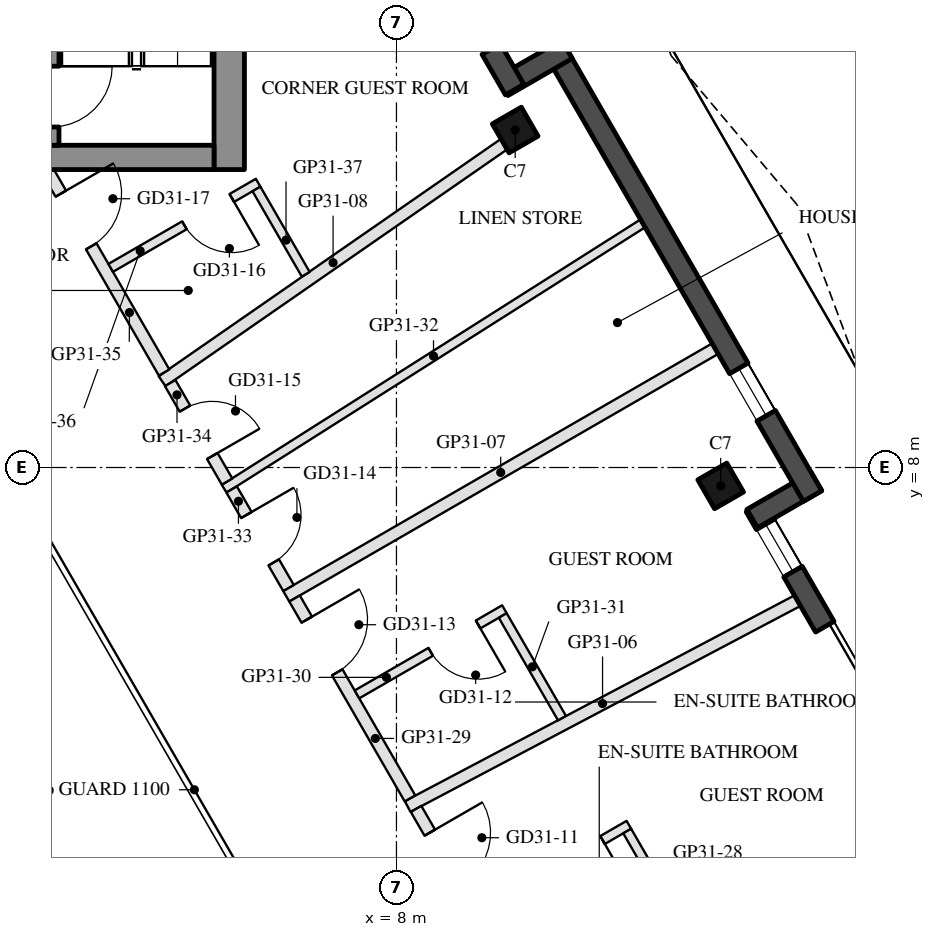
"""IFC4 building model, lengths in metres.
Left out: names, types, materials, properties, quantities, classifications, styles, units other than length and angle.
Written with IfcOpenShell. Run it as: python <this file> out.ifc"""

import sys

from ifc_helpers import new_model, si_unit, direction, frame, frame_2d, origin, origin_2d, place, context, subcontext, project, spatial, rectangle, hollow_rectangle, extrude, boolean, halfspace, element, fill, save


model = new_model("IFC4")
c1 = context("Model", 3, precision=1e-05, world=origin(), true_north=direction((0.0, 1.0)))
c2 = subcontext(c1, "Body", "Model", "MODEL_VIEW")
j1 = project(units=[si_unit("LENGTHUNIT", "METRE"), si_unit("PLANEANGLEUNIT", "RADIAN")], contexts=[c1])
p1 = place(None, origin())
s1 = spatial("IfcSite", under=j1, at=p1, CompositionType="ELEMENT")
p2 = place(p1, origin())
s2 = spatial("IfcBuilding", under=s1, at=p2, CompositionType="ELEMENT")
p3 = place(p2, frame((0.0, 0.0, 302.2)))
s3 = spatial("IfcBuildingStorey", under=s2, at=p3, CompositionType="ELEMENT", Elevation=302.2)
p4 = place(p3, frame((13.332, 7.697, 0.0), z_axis=(0.0, 0.0, 1.0), x_axis=(-0.5, 0.866025403784, 0.0)))
e1 = element("IfcColumn", 1, at=p4, inside=s3, PredefinedType="COLUMN", context=c2, shape_type="SweptSolid", body=[
    boolean("DIFFERENCE", extrude(hollow_rectangle(XDim=0.55, YDim=0.55, WallThickness=0.025, at=origin_2d()), origin(), (0.0, 0.0, 1.0), 3.7), halfspace(frame((0.0, 0.0, 0.031), z_axis=(0.0, 0.0, 1.0), x_axis=(1.0, 0.0, 0.0)), True)),
])
p5 = place(p3, frame((9.953, 13.551, 0.0), z_axis=(0.0, 0.0, 1.0), x_axis=(-0.5, 0.866025403784, 0.0)))
e2 = element("IfcColumn", 2, at=p5, inside=s3, PredefinedType="COLUMN", context=c2, shape_type="SweptSolid", body=[
    boolean("DIFFERENCE", extrude(hollow_rectangle(XDim=0.55, YDim=0.55, WallThickness=0.025, at=origin_2d()), origin(), (0.0, 0.0, 1.0), 3.7), halfspace(frame((0.0, 0.0, 0.034), z_axis=(0.0, 0.0, 1.0), x_axis=(1.0, 0.0, 0.0)), True)),
])
p6 = place(p3, frame((16.703, 2.509, 0.0), z_axis=(0.0, 0.0, 1.0), x_axis=(-0.499975351079, 0.866039634378, 0.0)))
e3 = element("IfcWall", 3, at=p6, inside=s3, PredefinedType="SOLIDWALL", context=c2, shape_type="SweptSolid", body=[
    extrude(rectangle(XDim=5.599, YDim=0.35, at=frame_2d((2.799, 0.0))), origin(), (0.0, 0.0, 1.0), 3.55),
])
p7 = place(p6, frame((0.917, 0.0, 0.0)))
e4 = element("IfcOpeningElement", 4, at=p7, cuts=e3, PredefinedType="OPENING", context=c2, shape_type="SweptSolid", body=[
    extrude(rectangle(XDim=2.4, YDim=2.4, at=frame_2d((1.2, 1.2))), frame((0.0, 0.185, 0.0), z_axis=(0.0, -1.0, 0.0), x_axis=(1.0, 0.0, 0.0)), (0.0, 0.0, 1.0), 0.37),
])
p8 = place(p6, frame((4.363, 0.0, 0.3)))
e5 = element("IfcOpeningElement", 5, at=p8, cuts=e3, PredefinedType="OPENING", context=c2, shape_type="SweptSolid", body=[
    extrude(rectangle(XDim=0.9, YDim=2.65, at=frame_2d((0.45, 1.325))), frame((0.0, 0.185, 0.0), z_axis=(0.0, -1.0, 0.0), x_axis=(1.0, 0.0, 0.0)), (0.0, 0.0, 1.0), 0.37),
])
p9 = place(p3, frame((13.85, 7.159, 0.0), z_axis=(0.0, 0.0, 1.0), x_axis=(0.866005645448, 0.500034220881, 0.0)))
e6 = element("IfcWall", 6, at=p9, inside=s3, PredefinedType="SOLIDWALL", context=c2, shape_type="SweptSolid", body=[
    extrude(rectangle(XDim=1.22, YDim=0.35, at=frame_2d((0.61, 0.0))), origin(), (0.0, 0.0, 1.0), 3.55),
])
p10 = place(p3, frame((14.843, 7.531, 0.0), z_axis=(0.0, 0.0, 1.0), x_axis=(-0.500013816581, 0.866017426631, 0.0)))
e7 = element("IfcWall", 7, at=p10, inside=s3, PredefinedType="SOLIDWALL", context=c2, shape_type="SweptSolid", body=[
    extrude(rectangle(XDim=8.559, YDim=0.35, at=frame_2d((4.279, 0.0))), origin(), (0.0, 0.0, 1.0), 3.55),
])
p11 = place(p10, frame((1.525, 0.0, 0.3)))
e8 = element("IfcOpeningElement", 8, at=p11, cuts=e7, PredefinedType="OPENING", context=c2, shape_type="SweptSolid", body=[
    extrude(rectangle(XDim=0.9, YDim=2.65, at=frame_2d((0.45, 1.325))), frame((0.0, 0.185, 0.0), z_axis=(0.0, -1.0, 0.0), x_axis=(1.0, 0.0, 0.0)), (0.0, 0.0, 1.0), 0.37),
])
p12 = place(p3, frame((10.802, 14.879, 0.0), z_axis=(0.0, 0.0, 1.0), x_axis=(-0.866005645448, -0.500034220881, 0.0)))
e9 = element("IfcWall", 9, at=p12, inside=s3, PredefinedType="SOLIDWALL", context=c2, shape_type="SweptSolid", body=[
    extrude(rectangle(XDim=1.22, YDim=0.35, at=frame_2d((0.61, 0.0))), origin(), (0.0, 0.0, 1.0), 3.55),
])
p13 = place(p3, frame((9.944, 14.216, 0.0), z_axis=(0.0, 0.0, 1.0), x_axis=(-0.500026936782, 0.866009851268, 0.0)))
e10 = element("IfcWall", 10, at=p13, inside=s3, PredefinedType="SOLIDWALL", context=c2, shape_type="SweptSolid", body=[
    extrude(rectangle(XDim=5.599, YDim=0.35, at=frame_2d((2.799, 0.0))), origin(), (0.0, 0.0, 1.0), 3.55),
])
p14 = place(p13, frame((0.77, 0.0, 0.0)))
e11 = element("IfcOpeningElement", 11, at=p14, cuts=e10, PredefinedType="OPENING", context=c2, shape_type="SweptSolid", body=[
    extrude(rectangle(XDim=2.4, YDim=2.4, at=frame_2d((1.2, 1.2))), frame((0.0, 0.185, 0.0), z_axis=(0.0, -1.0, 0.0), x_axis=(1.0, 0.0, 0.0)), (0.0, 0.0, 1.0), 0.37),
])
p15 = place(p13, frame((3.47, 0.0, 0.3)))
e12 = element("IfcOpeningElement", 12, at=p15, cuts=e10, PredefinedType="OPENING", context=c2, shape_type="SweptSolid", body=[
    extrude(rectangle(XDim=1.8, YDim=2.65, at=frame_2d((0.9, 1.325))), frame((0.0, 0.185, 0.0), z_axis=(0.0, -1.0, 0.0), x_axis=(1.0, 0.0, 0.0)), (0.0, 0.0, 1.0), 0.37),
])
p16 = place(p3, frame((5.25, 12.9, 0.0), z_axis=(0.0, 0.0, 1.0), x_axis=(0.0, 1.0, 0.0)))
e13 = element("IfcWall", 13, at=p16, inside=s3, PredefinedType="SHEAR", context=c2, shape_type="SweptSolid", body=[
    extrude(rectangle(XDim=10.299, YDim=0.5, at=frame_2d((5.149, 0.0))), origin(), (0.0, 0.0, 1.0), 3.5),
])
p17 = place(p3, frame((5.0, 13.1, 0.0), z_axis=(0.0, 0.0, 1.0), x_axis=(-1.0, 0.0, 0.0)))
e14 = element("IfcWall", 14, at=p17, inside=s3, PredefinedType="SHEAR", context=c2, shape_type="SweptSolid", body=[
    extrude(rectangle(XDim=10.0, YDim=0.4, at=frame_2d((5.0, 0.0))), origin(), (0.0, 0.0, 1.0), 3.5),
])
p18 = place(p17, frame((3.55, 0.0, 0.0)))
e15 = element("IfcOpeningElement", 15, at=p18, cuts=e14, PredefinedType="OPENING", context=c2, shape_type="SweptSolid", body=[
    extrude(rectangle(XDim=1.1, YDim=2.1, at=frame_2d((0.55, 1.05))), frame((0.0, 0.21, 0.0), z_axis=(0.0, -1.0, 0.0), x_axis=(1.0, 0.0, 0.0)), (0.0, 0.0, 1.0), 0.42),
])
p19 = place(p17, frame((5.85, 0.0, 0.0)))
e16 = element("IfcOpeningElement", 16, at=p19, cuts=e14, PredefinedType="OPENING", context=c2, shape_type="SweptSolid", body=[
    extrude(rectangle(XDim=1.4, YDim=2.1, at=frame_2d((0.7, 1.05))), frame((0.0, 0.21, 0.0), z_axis=(0.0, -1.0, 0.0), x_axis=(1.0, 0.0, 0.0)), (0.0, 0.0, 1.0), 0.42),
])
p20 = place(p3, frame((2.325, 13.3, 0.0), z_axis=(0.0, 0.0, 1.0), x_axis=(0.0, 1.0, 0.0)))
e17 = element("IfcWall", 17, at=p20, inside=s3, PredefinedType="SHEAR", context=c2, shape_type="SweptSolid", body=[
    extrude(rectangle(XDim=6.45, YDim=0.25, at=frame_2d((3.225, 0.0))), origin(), (0.0, 0.0, 1.0), 3.5),
])
p21 = place(p20, frame((0.3, 0.0, 0.0)))
e18 = element("IfcOpeningElement", 18, at=p21, cuts=e17, PredefinedType="OPENING", context=c2, shape_type="SweptSolid", body=[
    extrude(rectangle(XDim=1.0, YDim=2.1, at=frame_2d((0.5, 1.05))), frame((0.0, 0.135, 0.0), z_axis=(0.0, -1.0, 0.0), x_axis=(1.0, 0.0, 0.0)), (0.0, 0.0, 1.0), 0.27),
])
p22 = place(p3, frame((14.595, 5.81, 0.0), z_axis=(0.0, 0.0, 1.0), x_axis=(-0.884286267242, -0.46694517619, 0.0)))
e19 = element("IfcWall", 19, at=p22, inside=s3, PredefinedType="PARTITIONING", context=c2, shape_type="SweptSolid", body=[
    extrude(rectangle(XDim=7.25, YDim=0.2, at=frame_2d((3.625, 0.0))), origin(), (0.0, 0.0, 1.0), 3.16),
])
p23 = place(p3, frame((13.241, 9.954, 0.0), z_axis=(0.0, 0.0, 1.0), x_axis=(-0.866028345359, -0.499994905008, 0.0)))
e20 = element("IfcWall", 20, at=p23, inside=s3, PredefinedType="PARTITIONING", context=c2, shape_type="SweptSolid", body=[
    extrude(rectangle(XDim=8.145, YDim=0.2, at=frame_2d((4.072, 0.0))), origin(), (0.0, 0.0, 1.0), 3.16),
])
p24 = place(p3, frame((9.769, 13.318, 0.0), z_axis=(0.0, 0.0, 1.0), x_axis=(-0.821728251777, -0.569879531332, 0.0)))
e21 = element("IfcWall", 21, at=p24, inside=s3, PredefinedType="PARTITIONING", context=c2, shape_type="SweptSolid", body=[
    extrude(rectangle(XDim=6.843, YDim=0.2, at=frame_2d((3.421, 0.0))), origin(), (0.0, 0.0, 1.0), 3.1),
])
p25 = place(p3, frame((8.323, 2.385, 0.0), z_axis=(0.0, 0.0, 1.0), x_axis=(0.499998569178, -0.866026229868, 0.0)))
e22 = element("IfcWall", 22, at=p25, inside=s3, PredefinedType="PARTITIONING", context=c2, shape_type="SweptSolid", body=[
    extrude(rectangle(XDim=3.878, YDim=0.2, at=frame_2d((1.939, 0.0))), origin(), (0.0, 0.0, 1.0), 3.1),
])
p26 = place(p25, frame((0.451, 0.0, 0.0)))
e23 = element("IfcOpeningElement", 23, at=p26, cuts=e22, PredefinedType="OPENING", context=c2, shape_type="SweptSolid", body=[
    extrude(rectangle(XDim=1.0, YDim=2.1, at=frame_2d((0.5, 1.05))), frame((0.0, 0.11, 0.0), z_axis=(0.0, -1.0, 0.0), x_axis=(1.0, 0.0, 0.0)), (0.0, 0.0, 1.0), 0.22),
])
p27 = place(p3, frame((11.822, 2.123, 0.0), z_axis=(0.0, 0.0, 1.0), x_axis=(-0.865996816683, -0.500049511043, 0.0)))
e24 = element("IfcWall", 24, at=p27, inside=s3, PredefinedType="PARTITIONING", context=c2, shape_type="SweptSolid", body=[
    extrude(rectangle(XDim=2.8, YDim=0.15, at=frame_2d((1.4, 0.0))), origin(), (0.0, 0.0, 1.0), 3.55),
])
p28 = place(p27, frame((0.5, 0.0, 0.0)))
e25 = element("IfcOpeningElement", 25, at=p28, cuts=e24, PredefinedType="OPENING", context=c2, shape_type="SweptSolid", body=[
    extrude(rectangle(XDim=0.9, YDim=2.1, at=frame_2d((0.45, 1.05))), frame((0.0, 0.085, 0.0), z_axis=(0.0, -1.0, 0.0), x_axis=(1.0, 0.0, 0.0)), (0.0, 0.0, 1.0), 0.17),
])
p29 = place(p3, frame((13.034, -0.125, 0.0), z_axis=(0.0, 0.0, 1.0), x_axis=(-0.499975499923, 0.866039548448, 0.0)))
e26 = element("IfcWall", 26, at=p29, inside=s3, PredefinedType="PARTITIONING", context=c2, shape_type="SweptSolid", body=[
    extrude(rectangle(XDim=2.478, YDim=0.15, at=frame_2d((1.239, 0.0))), origin(), (0.0, 0.0, 1.0), 3.55),
])
p30 = place(p3, frame((6.325, 5.845, 0.0), z_axis=(0.0, 0.0, 1.0), x_axis=(0.499971120268, -0.866042076863, 0.0)))
e27 = element("IfcWall", 27, at=p30, inside=s3, PredefinedType="PARTITIONING", context=c2, shape_type="SweptSolid", body=[
    extrude(rectangle(XDim=3.796, YDim=0.2, at=frame_2d((1.898, 0.0))), origin(), (0.0, 0.0, 1.0), 3.1),
])
p31 = place(p30, frame((0.402, 0.0, 0.0)))
e28 = element("IfcOpeningElement", 28, at=p31, cuts=e27, PredefinedType="OPENING", context=c2, shape_type="SweptSolid", body=[
    extrude(rectangle(XDim=1.0, YDim=2.1, at=frame_2d((0.5, 1.05))), frame((0.0, 0.11, 0.0), z_axis=(0.0, -1.0, 0.0), x_axis=(1.0, 0.0, 0.0)), (0.0, 0.0, 1.0), 0.22),
])
p32 = place(p3, frame((9.775, 5.668, 0.0), z_axis=(0.0, 0.0, 1.0), x_axis=(-0.865996816683, -0.500049511043, 0.0)))
e29 = element("IfcWall", 29, at=p32, inside=s3, PredefinedType="PARTITIONING", context=c2, shape_type="SweptSolid", body=[
    extrude(rectangle(XDim=2.8, YDim=0.15, at=frame_2d((1.4, 0.0))), origin(), (0.0, 0.0, 1.0), 3.1),
])
p33 = place(p32, frame((0.5, 0.0, 0.0)))
e30 = element("IfcOpeningElement", 30, at=p33, cuts=e29, PredefinedType="OPENING", context=c2, shape_type="SweptSolid", body=[
    extrude(rectangle(XDim=0.9, YDim=2.1, at=frame_2d((0.45, 1.05))), frame((0.0, 0.085, 0.0), z_axis=(0.0, -1.0, 0.0), x_axis=(1.0, 0.0, 0.0)), (0.0, 0.0, 1.0), 0.17),
])
p34 = place(p3, frame((10.722, 3.878, 0.0), z_axis=(0.0, 0.0, 1.0), x_axis=(-0.49992486272, 0.866068779967, 0.0)))
e31 = element("IfcWall", 31, at=p34, inside=s3, PredefinedType="PARTITIONING", context=c2, shape_type="SweptSolid", body=[
    extrude(rectangle(XDim=1.949, YDim=0.15, at=frame_2d((0.975, 0.0))), origin(), (0.0, 0.0, 1.0), 3.1),
])
p35 = place(p3, frame((12.052, 12.015, 0.0), z_axis=(0.0, 0.0, 1.0), x_axis=(-0.844566720388, -0.535450328987, 0.0)))
e32 = element("IfcWall", 32, at=p35, inside=s3, PredefinedType="PARTITIONING", context=c2, shape_type="SweptSolid", body=[
    extrude(rectangle(XDim=8.152, YDim=0.15, at=frame_2d((4.076, 0.0))), origin(), (0.0, 0.0, 1.0), 3.16),
])
p36 = place(p3, frame((5.289, 7.639, 0.0), z_axis=(0.0, 0.0, 1.0), x_axis=(0.499970989427, -0.866042152399, 0.0)))
e33 = element("IfcWall", 33, at=p36, inside=s3, PredefinedType="PARTITIONING", context=c2, shape_type="SweptSolid", body=[
    extrude(rectangle(XDim=1.871, YDim=0.2, at=frame_2d((0.935, 0.0))), origin(), (0.0, 0.0, 1.0), 3.1),
])
p37 = place(p36, frame((0.486, 0.0, 0.0)))
e34 = element("IfcOpeningElement", 34, at=p37, cuts=e33, PredefinedType="OPENING", context=c2, shape_type="SweptSolid", body=[
    extrude(rectangle(XDim=0.9, YDim=2.1, at=frame_2d((0.45, 1.05))), frame((0.0, 0.11, 0.0), z_axis=(0.0, -1.0, 0.0), x_axis=(1.0, 0.0, 0.0)), (0.0, 0.0, 1.0), 0.22),
])
p38 = place(p3, frame((4.279, 9.389, 0.0), z_axis=(0.0, 0.0, 1.0), x_axis=(0.500027503603, -0.86600952399, 0.0)))
e35 = element("IfcWall", 35, at=p38, inside=s3, PredefinedType="PARTITIONING", context=c2, shape_type="SweptSolid", body=[
    extrude(rectangle(XDim=1.871, YDim=0.2, at=frame_2d((0.935, 0.0))), origin(), (0.0, 0.0, 1.0), 3.55),
])
p39 = place(p38, frame((0.485, 0.0, 0.0)))
e36 = element("IfcOpeningElement", 36, at=p39, cuts=e35, PredefinedType="OPENING", context=c2, shape_type="SweptSolid", body=[
    extrude(rectangle(XDim=0.9, YDim=2.1, at=frame_2d((0.45, 1.05))), frame((0.0, 0.11, 0.0), z_axis=(0.0, -1.0, 0.0), x_axis=(1.0, 0.0, 0.0)), (0.0, 0.0, 1.0), 0.22),
])
p40 = place(p3, frame((2.281, 12.85, 0.0), z_axis=(0.0, 0.0, 1.0), x_axis=(0.500019354728, -0.866014229038, 0.0)))
e37 = element("IfcWall", 37, at=p40, inside=s3, PredefinedType="PARTITIONING", context=c2, shape_type="SweptSolid", body=[
    extrude(rectangle(XDim=3.796, YDim=0.2, at=frame_2d((1.898, 0.0))), origin(), (0.0, 0.0, 1.0), 3.1),
])
p41 = place(p40, frame((0.4, 0.0, 0.0)))
e38 = element("IfcOpeningElement", 38, at=p41, cuts=e37, PredefinedType="OPENING", context=c2, shape_type="SweptSolid", body=[
    extrude(rectangle(XDim=1.0, YDim=2.1, at=frame_2d((0.5, 1.05))), frame((0.0, 0.11, 0.0), z_axis=(0.0, -1.0, 0.0), x_axis=(1.0, 0.0, 0.0)), (0.0, 0.0, 1.0), 0.22),
])
p42 = place(p3, frame((5.725, 12.683, 0.0), z_axis=(0.0, 0.0, 1.0), x_axis=(-0.866034573852, -0.49998411664, 0.0)))
e39 = element("IfcWall", 39, at=p42, inside=s3, PredefinedType="PARTITIONING", context=c2, shape_type="SweptSolid", body=[
    extrude(rectangle(XDim=2.8, YDim=0.15, at=frame_2d((1.4, 0.0))), origin(), (0.0, 0.0, 1.0), 3.55),
])
p43 = place(p42, frame((0.5, 0.0, 0.0)))
e40 = element("IfcOpeningElement", 40, at=p43, cuts=e39, PredefinedType="OPENING", context=c2, shape_type="SweptSolid", body=[
    extrude(rectangle(XDim=0.9, YDim=2.1, at=frame_2d((0.45, 1.05))), frame((0.0, 0.085, 0.0), z_axis=(0.0, -1.0, 0.0), x_axis=(1.0, 0.0, 0.0)), (0.0, 0.0, 1.0), 0.17),
])
p44 = place(p3, frame((6.508, 11.178, 0.0), z_axis=(0.0, 0.0, 1.0), x_axis=(-0.500061642096, 0.865989811779, 0.0)))
e41 = element("IfcWall", 41, at=p44, inside=s3, PredefinedType="PARTITIONING", context=c2, shape_type="SweptSolid", body=[
    extrude(rectangle(XDim=1.62, YDim=0.15, at=frame_2d((0.81, 0.0))), origin(), (0.0, 0.0, 1.0), 3.1),
])
p45 = place(p7, frame((2.4, 0.0, 0.0), z_axis=(0.0, 0.0, 1.0), x_axis=(-1.0, 0.0, 0.0)))
e42 = element("IfcDoor", 42, at=p45, inside=s3, OperationType="SLIDING_TO_LEFT", PredefinedType="DOOR", context=c2, shape_type="SweptSolid", body=[
    extrude(rectangle(XDim=2.4, YDim=2.4, at=frame_2d((1.2, 1.2))), frame((0.0, 0.025, 0.0), z_axis=(0.0, -1.0, 0.0), x_axis=(1.0, 0.0, 0.0)), (0.0, 0.0, 1.0), 0.05),
])
fill(e4, e42)
p46 = place(p8, origin())
e43 = element("IfcWindow", 43, at=p46, inside=s3, PartitioningType="SINGLE_PANEL", PredefinedType="WINDOW", context=c2, shape_type="SweptSolid", body=[
    extrude(rectangle(XDim=0.9, YDim=2.65, at=frame_2d((0.45, 1.325))), frame((0.0, 0.03, 0.0), z_axis=(0.0, -1.0, 0.0), x_axis=(1.0, 0.0, 0.0)), (0.0, 0.0, 1.0), 0.06),
])
fill(e5, e43)
p47 = place(p11, origin())
e44 = element("IfcWindow", 44, at=p47, inside=s3, PartitioningType="SINGLE_PANEL", PredefinedType="WINDOW", context=c2, shape_type="SweptSolid", body=[
    extrude(rectangle(XDim=0.9, YDim=2.65, at=frame_2d((0.45, 1.325))), frame((0.0, 0.03, 0.0), z_axis=(0.0, -1.0, 0.0), x_axis=(1.0, 0.0, 0.0)), (0.0, 0.0, 1.0), 0.06),
])
fill(e8, e44)
p48 = place(p21, frame((1.0, 0.0, 0.0), z_axis=(0.0, 0.0, 1.0), x_axis=(-1.0, 0.0, 0.0)))
e45 = element("IfcDoor", 45, at=p48, inside=s3, OperationType="SINGLE_SWING_LEFT", PredefinedType="DOOR", context=c2, shape_type="SweptSolid", body=[
    extrude(rectangle(XDim=1.0, YDim=2.1, at=frame_2d((0.5, 1.05))), frame((0.0, 0.025, 0.0), z_axis=(0.0, -1.0, 0.0), x_axis=(1.0, 0.0, 0.0)), (0.0, 0.0, 1.0), 0.05),
])
fill(e18, e45)
p49 = place(p28, origin())
e46 = element("IfcDoor", 46, at=p49, inside=s3, OperationType="SINGLE_SWING_LEFT", PredefinedType="DOOR", context=c2, shape_type="SweptSolid", body=[
    extrude(rectangle(XDim=0.9, YDim=2.1, at=frame_2d((0.45, 1.05))), frame((0.0, 0.025, 0.0), z_axis=(0.0, -1.0, 0.0), x_axis=(1.0, 0.0, 0.0)), (0.0, 0.0, 1.0), 0.05),
])
fill(e25, e46)
p50 = place(p26, origin())
e47 = element("IfcDoor", 47, at=p50, inside=s3, OperationType="SINGLE_SWING_LEFT", PredefinedType="DOOR", context=c2, shape_type="SweptSolid", body=[
    extrude(rectangle(XDim=1.0, YDim=2.1, at=frame_2d((0.5, 1.05))), frame((0.0, 0.025, 0.0), z_axis=(0.0, -1.0, 0.0), x_axis=(1.0, 0.0, 0.0)), (0.0, 0.0, 1.0), 0.05),
])
fill(e23, e47)
p51 = place(p33, origin())
e48 = element("IfcDoor", 48, at=p51, inside=s3, OperationType="SINGLE_SWING_LEFT", PredefinedType="DOOR", context=c2, shape_type="SweptSolid", body=[
    extrude(rectangle(XDim=0.9, YDim=2.1, at=frame_2d((0.45, 1.05))), frame((0.0, 0.025, 0.0), z_axis=(0.0, -1.0, 0.0), x_axis=(1.0, 0.0, 0.0)), (0.0, 0.0, 1.0), 0.05),
])
fill(e30, e48)
p52 = place(p31, origin())
e49 = element("IfcDoor", 49, at=p52, inside=s3, OperationType="SINGLE_SWING_LEFT", PredefinedType="DOOR", context=c2, shape_type="SweptSolid", body=[
    extrude(rectangle(XDim=1.0, YDim=2.1, at=frame_2d((0.5, 1.05))), frame((0.0, 0.025, 0.0), z_axis=(0.0, -1.0, 0.0), x_axis=(1.0, 0.0, 0.0)), (0.0, 0.0, 1.0), 0.05),
])
fill(e28, e49)
p53 = place(p37, origin())
e50 = element("IfcDoor", 50, at=p53, inside=s3, OperationType="SINGLE_SWING_LEFT", PredefinedType="DOOR", context=c2, shape_type="SweptSolid", body=[
    extrude(rectangle(XDim=0.9, YDim=2.1, at=frame_2d((0.45, 1.05))), frame((0.0, 0.025, 0.0), z_axis=(0.0, -1.0, 0.0), x_axis=(1.0, 0.0, 0.0)), (0.0, 0.0, 1.0), 0.05),
])
fill(e34, e50)
p54 = place(p39, origin())
e51 = element("IfcDoor", 51, at=p54, inside=s3, OperationType="SINGLE_SWING_RIGHT", PredefinedType="DOOR", context=c2, shape_type="SweptSolid", body=[
    extrude(rectangle(XDim=0.9, YDim=2.1, at=frame_2d((0.45, 1.05))), frame((0.0, 0.025, 0.0), z_axis=(0.0, -1.0, 0.0), x_axis=(1.0, 0.0, 0.0)), (0.0, 0.0, 1.0), 0.05),
])
fill(e36, e51)
p55 = place(p43, origin())
e52 = element("IfcDoor", 52, at=p55, inside=s3, OperationType="SINGLE_SWING_LEFT", PredefinedType="DOOR", context=c2, shape_type="SweptSolid", body=[
    extrude(rectangle(XDim=0.9, YDim=2.1, at=frame_2d((0.45, 1.05))), frame((0.0, 0.025, 0.0), z_axis=(0.0, -1.0, 0.0), x_axis=(1.0, 0.0, 0.0)), (0.0, 0.0, 1.0), 0.05),
])
fill(e40, e52)
p56 = place(p41, origin())
e53 = element("IfcDoor", 53, at=p56, inside=s3, OperationType="SINGLE_SWING_LEFT", PredefinedType="DOOR", context=c2, shape_type="SweptSolid", body=[
    extrude(rectangle(XDim=1.0, YDim=2.1, at=frame_2d((0.5, 1.05))), frame((0.0, 0.025, 0.0), z_axis=(0.0, -1.0, 0.0), x_axis=(1.0, 0.0, 0.0)), (0.0, 0.0, 1.0), 0.05),
])
fill(e38, e53)
save(model, sys.argv[1])
